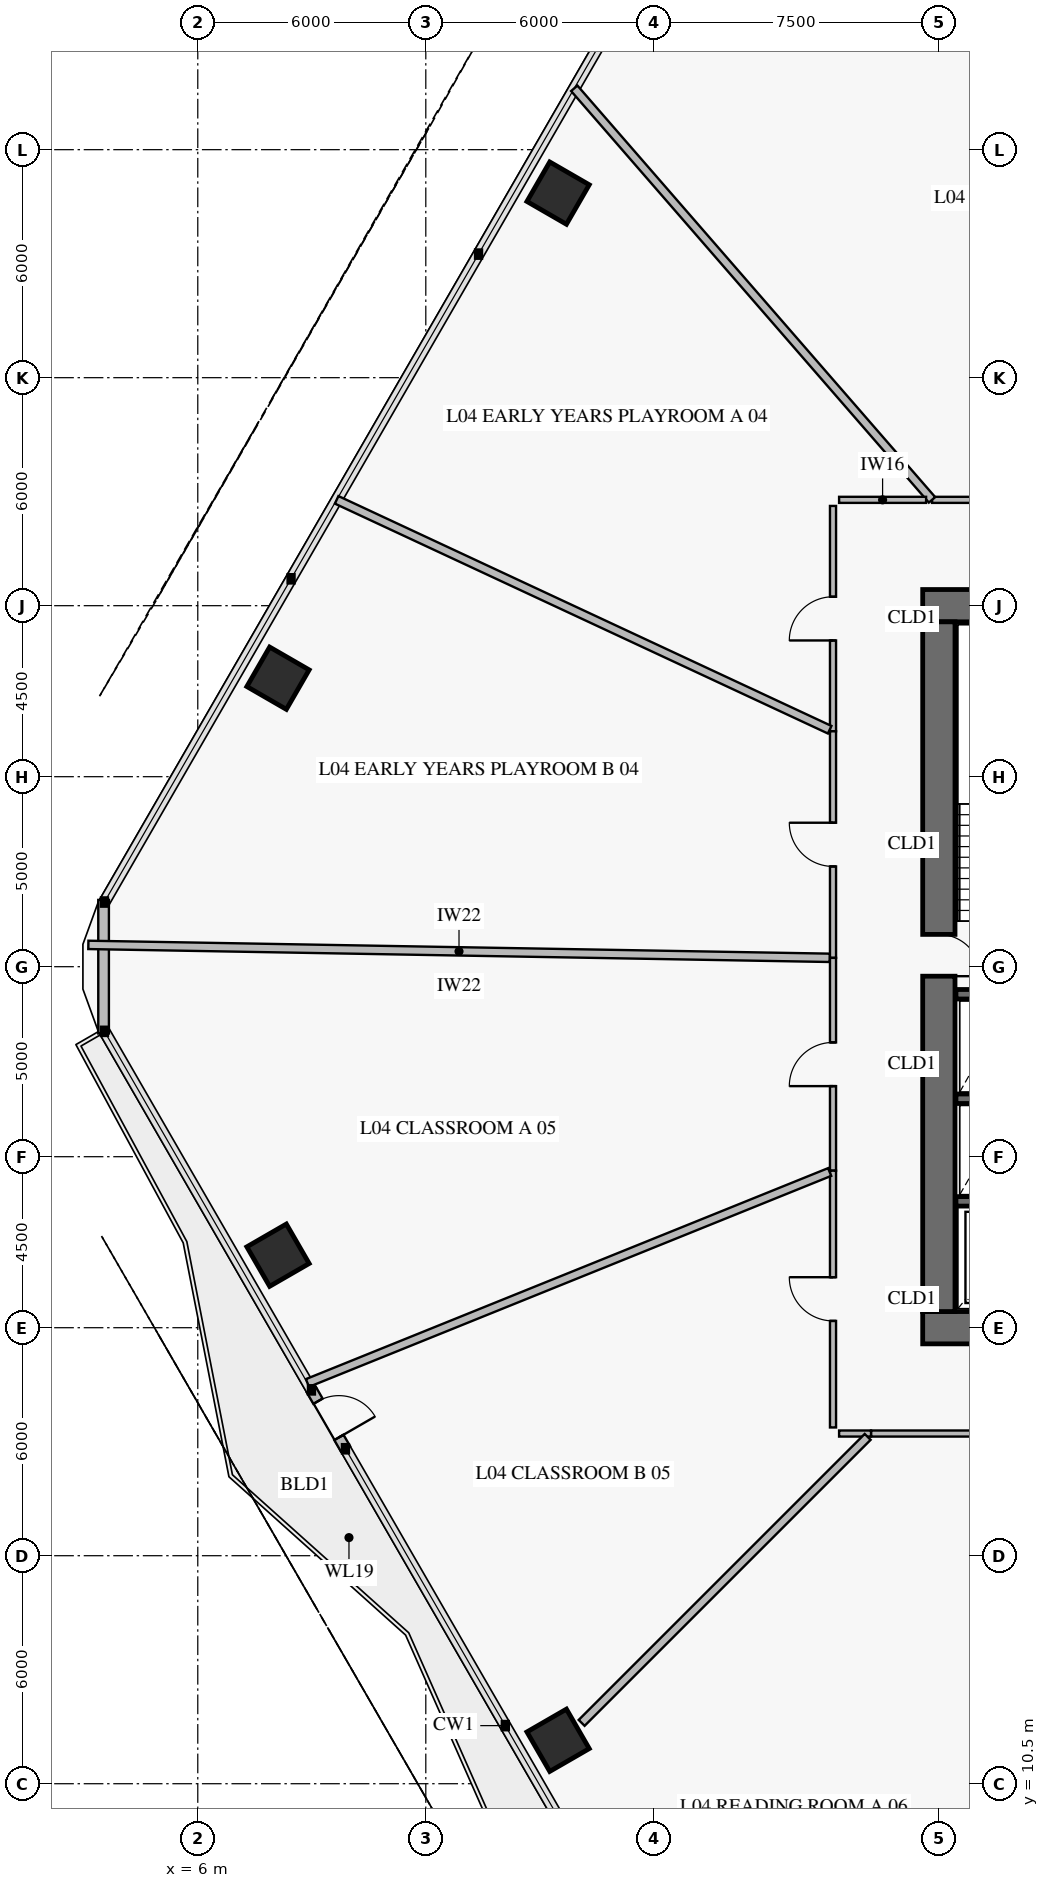
"""IFC4 building model, lengths in metres.
Left out: names, types, materials, properties, quantities, classifications, styles, units other than length and angle.
Written with IfcOpenShell. Run it as: python <this file> out.ifc"""

import sys

from ifc_helpers import new_model, si_unit, direction, frame, frame_2d, origin, origin_2d, place, context, subcontext, project, spatial, rectangle, extrude, element, fill, save


model = new_model("IFC4")
c1 = context("Model", 3, precision=1e-05, world=origin(), true_north=direction((0.0, 1.0)))
c2 = subcontext(c1, "Body", "Model", "MODEL_VIEW")
j1 = project(units=[si_unit("LENGTHUNIT", "METRE"), si_unit("PLANEANGLEUNIT", "RADIAN")], contexts=[c1])
p1 = place(None, origin())
s1 = spatial("IfcSite", under=j1, at=p1, CompositionType="ELEMENT")
p2 = place(p1, origin())
s2 = spatial("IfcBuilding", under=s1, at=p2, CompositionType="ELEMENT")
p3 = place(p2, frame((0.0, 0.0, 16.2)))
s3 = spatial("IfcBuildingStorey", under=s2, at=p3, CompositionType="ELEMENT", Elevation=16.2)
p4 = place(p3, frame((25.075, 22.5, 0.0), z_axis=(0.0, 0.0, 1.0), x_axis=(1.0, 0.0, 0.0)))
e1 = element("IfcWall", 1, at=p4, inside=s3, PredefinedType="SHEAR", context=c2, shape_type="SweptSolid", body=[
    extrude(rectangle(XDim=9.975, YDim=0.85, at=frame_2d((4.988, 0.0))), origin(), (0.0, 0.0, 1.0), 4.2),
])
p5 = place(p4, frame((4.325, 0.0, 0.0)))
e2 = element("IfcOpeningElement", 2, at=p5, cuts=e1, PredefinedType="OPENING", context=c2, shape_type="SweptSolid", body=[
    extrude(rectangle(XDim=1.5, YDim=2.15, at=frame_2d((0.75, 1.075))), frame((0.0, 0.437, 0.0), z_axis=(0.0, -1.0, 0.0), x_axis=(1.0, 0.0, 0.0)), (0.0, 0.0, 1.0), 0.874),
])
p6 = place(p3, frame((36.75, 41.5, 0.0), z_axis=(0.0, 0.0, 1.0), x_axis=(-1.0, 0.0, 0.0)))
e3 = element("IfcWall", 3, at=p6, inside=s3, PredefinedType="SHEAR", context=c2, shape_type="SweptSolid", body=[
    extrude(rectangle(XDim=11.675, YDim=0.85, at=frame_2d((5.837, 0.0))), origin(), (0.0, 0.0, 1.0), 4.2),
])
p7 = place(p6, frame((4.25, 0.0, 0.0)))
e4 = element("IfcOpeningElement", 4, at=p7, cuts=e3, PredefinedType="OPENING", context=c2, shape_type="SweptSolid", body=[
    extrude(rectangle(XDim=1.1, YDim=2.15, at=frame_2d((0.55, 1.075))), frame((0.0, 0.437, 0.0), z_axis=(0.0, -1.0, 0.0), x_axis=(1.0, 0.0, 0.0)), (0.0, 0.0, 1.0), 0.874),
])
p8 = place(p3, frame((25.5, 22.925, 0.0), z_axis=(0.0, 0.0, 1.0), x_axis=(0.0, 1.0, 0.0)))
e5 = element("IfcWall", 5, at=p8, inside=s3, PredefinedType="SHEAR", context=c2, shape_type="SweptSolid", body=[
    extrude(rectangle(XDim=18.15, YDim=0.85, at=frame_2d((9.075, 0.0))), origin(), (0.0, 0.0, 1.0), 4.2),
])
p9 = place(p8, frame((8.825, 0.0, 0.0)))
e6 = element("IfcOpeningElement", 6, at=p9, cuts=e5, PredefinedType="OPENING", context=c2, shape_type="SweptSolid", body=[
    extrude(rectangle(XDim=1.1, YDim=2.15, at=frame_2d((0.55, 1.075))), frame((0.0, 0.437, 0.0), z_axis=(0.0, -1.0, 0.0), x_axis=(1.0, 0.0, 0.0)), (0.0, 0.0, 1.0), 0.874),
])
for number, where, z_axis, x_axis in (
    (7, (15.481, 52.357, 0.0), (0.0, 0.0, 1.0), (-0.5, -0.866, 0.0)),
    (8, (8.111, 39.592, 0.0), (0.0, 0.0, 1.0), (-0.5, -0.866, 0.0)),
    (9, (8.111, 24.408, 0.0), (0.0, 0.0, 1.0), (0.5, -0.866, 0.0)),
    (10, (15.481, 11.643, 0.0), (0.0, 0.0, 1.0), (0.5, -0.866, 0.0)),
):
    element("IfcColumn", number, at=place(p3, frame(where, z_axis=z_axis, x_axis=x_axis)), inside=s3, PredefinedType="COLUMN", context=c2, shape_type="SweptSolid", body=[
        extrude(rectangle(XDim=1.2, YDim=1.2, at=origin_2d()), origin(), (0.0, 0.0, 1.0), 3.92),
    ])
p10 = place(p3, frame((9.886, 19.314, 0.0), z_axis=(0.0, 0.0, 1.0), x_axis=(-0.499982180423, 0.866035691677, 0.0)))
e11 = element("IfcWall", 11, at=p10, inside=s3, PredefinedType="SOLIDWALL", context=c2, shape_type="SweptSolid", body=[
    extrude(rectangle(XDim=1.79, YDim=0.28, at=frame_2d((0.895, 0.0))), origin(), (0.0, 0.0, 1.0), 3.92),
])
p11 = place(p10, frame((0.345, 0.0, 0.0)))
e12 = element("IfcOpeningElement", 12, at=p11, cuts=e11, PredefinedType="OPENING", context=c2, shape_type="SweptSolid", body=[
    extrude(rectangle(XDim=1.1, YDim=2.2, at=frame_2d((0.55, 1.1))), frame((0.0, 0.152, 0.0), z_axis=(0.0, -1.0, 0.0), x_axis=(1.0, 0.0, 0.0)), (0.0, 0.0, 1.0), 0.304),
])
p12 = place(p3, frame((3.521, 30.242, 0.0), z_axis=(0.0, 0.0, 1.0), x_axis=(0.0, 1.0, 0.0)))
e13 = element("IfcWall", 13, at=p12, inside=s3, PredefinedType="SOLIDWALL", context=c2, shape_type="SweptSolid", body=[
    extrude(rectangle(XDim=3.515, YDim=0.28, at=frame_2d((1.758, 0.0))), origin(), (0.0, 0.0, 1.0), 3.92),
])
p13 = place(p3, frame((25.95, 31.275, 0.0), z_axis=(0.0, 0.0, 1.0), x_axis=(1.0, 0.0, 0.0)))
e14 = element("IfcWall", 14, at=p13, inside=s3, PredefinedType="SOLIDWALL", context=c2, shape_type="SweptSolid", body=[
    extrude(rectangle(XDim=20.1, YDim=0.25, at=frame_2d((10.05, 0.0))), origin(), (0.0, 0.0, 1.0), 4.2),
])
p14 = place(p13, frame((2.6, 0.0, 0.0)))
e15 = element("IfcOpeningElement", 15, at=p14, cuts=e14, PredefinedType="OPENING", context=c2, shape_type="SweptSolid", body=[
    extrude(rectangle(XDim=1.1, YDim=2.15, at=frame_2d((0.55, 1.075))), frame((0.0, 0.137, 0.0), z_axis=(0.0, -1.0, 0.0), x_axis=(1.0, 0.0, 0.0)), (0.0, 0.0, 1.0), 0.274),
])
p15 = place(p13, frame((10.6, 0.0, 0.0)))
e16 = element("IfcOpeningElement", 16, at=p15, cuts=e14, PredefinedType="OPENING", context=c2, shape_type="SweptSolid", body=[
    extrude(rectangle(XDim=1.1, YDim=2.15, at=frame_2d((0.55, 1.075))), frame((0.0, 0.137, 0.0), z_axis=(0.0, -1.0, 0.0), x_axis=(1.0, 0.0, 0.0)), (0.0, 0.0, 1.0), 0.274),
])
p16 = place(p13, frame((16.35, 0.0, 0.0)))
e17 = element("IfcOpeningElement", 17, at=p16, cuts=e14, PredefinedType="OPENING", context=c2, shape_type="SweptSolid", body=[
    extrude(rectangle(XDim=1.1, YDim=2.15, at=frame_2d((0.55, 1.075))), frame((0.0, 0.137, 0.0), z_axis=(0.0, -1.0, 0.0), x_axis=(1.0, 0.0, 0.0)), (0.0, 0.0, 1.0), 0.274),
])
for number, where, z_axis, x_axis in (
    (18, (25.95, 25.825, 0.0), (0.0, 0.0, 1.0), (1.0, 0.0, 0.0)),
    (19, (25.95, 28.525, 0.0), (0.0, 0.0, 1.0), (1.0, 0.0, 0.0)),
):
    element("IfcWall", number, at=place(p3, frame(where, z_axis=z_axis, x_axis=x_axis)), inside=s3, PredefinedType="SOLIDWALL", context=c2, shape_type="SweptSolid", body=[
        extrude(rectangle(XDim=2.25, YDim=0.25, at=frame_2d((1.125, 0.0))), origin(), (0.0, 0.0, 1.0), 4.2),
    ])
p17 = place(p3, frame((37.075, 44.285, 0.0), z_axis=(0.0, 0.0, 1.0), x_axis=(-1.0, 0.0, 0.0)))
e20 = element("IfcWall", 20, at=p17, inside=s3, PredefinedType="PARTITIONING", context=c2, shape_type="SweptSolid", body=[
    extrude(rectangle(XDim=11.754, YDim=0.16, at=frame_2d((5.877, 0.0))), origin(), (0.0, 0.0, 1.0), 3.22),
])
p18 = place(p17, frame((5.302, 0.0, 0.0)))
e21 = element("IfcOpeningElement", 21, at=p18, cuts=e20, PredefinedType="OPENING", context=c2, shape_type="SweptSolid", body=[
    extrude(rectangle(XDim=1.15, YDim=2.2, at=frame_2d((0.575, 1.1))), frame((0.0, 0.092, 0.0), z_axis=(0.0, -1.0, 0.0), x_axis=(1.0, 0.0, 0.0)), (0.0, 0.0, 1.0), 0.184),
])
p19 = place(p3, frame((22.715, 44.125, 0.0), z_axis=(0.0, 0.0, 1.0), x_axis=(0.0, -1.0, 0.0)))
e22 = element("IfcWall", 22, at=p19, inside=s3, PredefinedType="PARTITIONING", context=c2, shape_type="SweptSolid", body=[
    extrude(rectangle(XDim=5.93, YDim=0.16, at=frame_2d((2.965, 0.0))), origin(), (0.0, 0.0, 1.0), 3.92),
])
p20 = place(p19, frame((2.39, 0.0, 0.0)))
e23 = element("IfcOpeningElement", 23, at=p20, cuts=e22, PredefinedType="OPENING", context=c2, shape_type="SweptSolid", body=[
    extrude(rectangle(XDim=1.15, YDim=2.2, at=frame_2d((0.575, 1.1))), frame((0.0, 0.092, 0.0), z_axis=(0.0, -1.0, 0.0), x_axis=(1.0, 0.0, 0.0)), (0.0, 0.0, 1.0), 0.184),
])
p21 = place(p3, frame((22.715, 38.195, 0.0), z_axis=(0.0, 0.0, 1.0), x_axis=(0.0, -1.0, 0.0)))
e24 = element("IfcWall", 24, at=p21, inside=s3, PredefinedType="PARTITIONING", context=c2, shape_type="SweptSolid", body=[
    extrude(rectangle(XDim=5.963, YDim=0.16, at=frame_2d((2.981, 0.0))), origin(), (0.0, 0.0, 1.0), 3.22),
])
p22 = place(p21, frame((2.406, 0.0, 0.0)))
e25 = element("IfcOpeningElement", 25, at=p22, cuts=e24, PredefinedType="OPENING", context=c2, shape_type="SweptSolid", body=[
    extrude(rectangle(XDim=1.15, YDim=2.2, at=frame_2d((0.575, 1.1))), frame((0.0, 0.092, 0.0), z_axis=(0.0, -1.0, 0.0), x_axis=(1.0, 0.0, 0.0)), (0.0, 0.0, 1.0), 0.184),
])
p23 = place(p3, frame((22.715, 32.232, 0.0), z_axis=(0.0, 0.0, 1.0), x_axis=(0.0, -1.0, 0.0)))
e26 = element("IfcWall", 26, at=p23, inside=s3, PredefinedType="PARTITIONING", context=c2, shape_type="SweptSolid", body=[
    extrude(rectangle(XDim=5.599, YDim=0.16, at=frame_2d((2.8, 0.0))), origin(), (0.0, 0.0, 1.0), 3.22),
])
p24 = place(p23, frame((2.225, 0.0, 0.0)))
e27 = element("IfcOpeningElement", 27, at=p24, cuts=e26, PredefinedType="OPENING", context=c2, shape_type="SweptSolid", body=[
    extrude(rectangle(XDim=1.15, YDim=2.2, at=frame_2d((0.575, 1.1))), frame((0.0, 0.092, 0.0), z_axis=(0.0, -1.0, 0.0), x_axis=(1.0, 0.0, 0.0)), (0.0, 0.0, 1.0), 0.184),
])
p25 = place(p3, frame((22.715, 26.633, 0.0), z_axis=(0.0, 0.0, 1.0), x_axis=(0.0, -1.0, 0.0)))
e28 = element("IfcWall", 28, at=p25, inside=s3, PredefinedType="PARTITIONING", context=c2, shape_type="SweptSolid", body=[
    extrude(rectangle(XDim=6.758, YDim=0.16, at=frame_2d((3.379, 0.0))), origin(), (0.0, 0.0, 1.0), 3.92),
])
p26 = place(p25, frame((2.804, 0.0, 0.0)))
e29 = element("IfcOpeningElement", 29, at=p26, cuts=e28, PredefinedType="OPENING", context=c2, shape_type="SweptSolid", body=[
    extrude(rectangle(XDim=1.15, YDim=2.2, at=frame_2d((0.575, 1.1))), frame((0.0, 0.092, 0.0), z_axis=(0.0, -1.0, 0.0), x_axis=(1.0, 0.0, 0.0)), (0.0, 0.0, 1.0), 0.184),
])
p27 = place(p3, frame((23.715, 19.715, 0.0), z_axis=(0.0, 0.0, 1.0), x_axis=(1.0, 0.0, 0.0)))
e30 = element("IfcWall", 30, at=p27, inside=s3, PredefinedType="PARTITIONING", context=c2, shape_type="SweptSolid", body=[
    extrude(rectangle(XDim=7.569, YDim=0.16, at=frame_2d((3.785, 0.0))), origin(), (0.0, 0.0, 1.0), 3.22),
])
p28 = place(p27, frame((3.21, 0.0, 0.0)))
e31 = element("IfcOpeningElement", 31, at=p28, cuts=e30, PredefinedType="OPENING", context=c2, shape_type="SweptSolid", body=[
    extrude(rectangle(XDim=1.15, YDim=2.2, at=frame_2d((0.575, 1.1))), frame((0.0, 0.092, 0.0), z_axis=(0.0, -1.0, 0.0), x_axis=(1.0, 0.0, 0.0)), (0.0, 0.0, 1.0), 0.184),
])
p29 = place(p3, frame((25.321, 44.285, 0.0), z_axis=(0.0, 0.0, 1.0), x_axis=(-0.656060762546, 0.754708073263, 0.0)))
e32 = element("IfcWall", 32, at=p29, inside=s3, PredefinedType="PARTITIONING", context=c2, shape_type="SweptSolid", body=[
    extrude(rectangle(XDim=14.349, YDim=0.22, at=frame_2d((7.175, 0.0))), origin(), (0.0, 0.0, 1.0), 3.17),
])
p30 = place(p3, frame((22.627, 38.236, 0.0), z_axis=(0.0, 0.0, 1.0), x_axis=(-0.906309468756, 0.422614655263, 0.0)))
e33 = element("IfcWall", 33, at=p30, inside=s3, PredefinedType="PARTITIONING", context=c2, shape_type="SweptSolid", body=[
    extrude(rectangle(XDim=14.313, YDim=0.22, at=frame_2d((7.157, 0.0))), origin(), (0.0, 0.0, 1.0), 3.17),
])
p31 = place(p3, frame((25.164, 44.285, 0.0), z_axis=(0.0, 0.0, 1.0), x_axis=(-1.0, 0.0, 0.0)))
e34 = element("IfcWall", 34, at=p31, inside=s3, PredefinedType="PARTITIONING", context=c2, shape_type="SweptSolid", body=[
    extrude(rectangle(XDim=2.289, YDim=0.16, at=frame_2d((1.145, 0.0))), origin(), (0.0, 0.0, 1.0), 3.22),
])
p32 = place(p3, frame((22.627, 32.233, 0.0), z_axis=(0.0, 0.0, 1.0), x_axis=(-0.999847613209, 0.017457100559, 0.0)))
e35 = element("IfcWall", 35, at=p32, inside=s3, PredefinedType="PARTITIONING", context=c2, shape_type="SweptSolid", body=[
    extrude(rectangle(XDim=19.509, YDim=0.22, at=frame_2d((9.755, 0.0))), origin(), (0.0, 0.0, 1.0), 3.17),
])
p33 = place(p3, frame((22.627, 26.597, 0.0), z_axis=(0.0, 0.0, 1.0), x_axis=(-0.927186166431, -0.3746008713, 0.0)))
e36 = element("IfcWall", 36, at=p33, inside=s3, PredefinedType="PARTITIONING", context=c2, shape_type="SweptSolid", body=[
    extrude(rectangle(XDim=14.82, YDim=0.22, at=frame_2d((7.41, 0.0))), origin(), (0.0, 0.0, 1.0), 3.17),
])
p34 = place(p3, frame((22.875, 19.715, 0.0), z_axis=(0.0, 0.0, 1.0), x_axis=(1.0, 0.0, 0.0)))
e37 = element("IfcWall", 37, at=p34, inside=s3, PredefinedType="PARTITIONING", context=c2, shape_type="SweptSolid", body=[
    extrude(rectangle(XDim=0.84, YDim=0.16, at=frame_2d((0.42, 0.0))), origin(), (0.0, 0.0, 1.0), 3.22),
])
p35 = place(p3, frame((23.627, 19.627, 0.0), z_axis=(0.0, 0.0, 1.0), x_axis=(-0.707106781187, -0.707106781187, 0.0)))
e38 = element("IfcWall", 38, at=p35, inside=s3, PredefinedType="PARTITIONING", context=c2, shape_type="SweptSolid", body=[
    extrude(rectangle(XDim=10.643, YDim=0.22, at=frame_2d((5.322, 0.0))), origin(), (0.0, 0.0, 1.0), 3.22),
])
p36 = place(p3, frame((31.25, 19.627, 0.0), z_axis=(0.0, 0.0, 1.0), x_axis=(-0.358374904207, -0.933577756823, 0.0)))
e39 = element("IfcWall", 39, at=p36, inside=s3, PredefinedType="PARTITIONING", context=c2, shape_type="SweptSolid", body=[
    extrude(rectangle(XDim=17.765, YDim=0.22, at=frame_2d((8.883, 0.0))), origin(), (0.0, 0.0, 1.0), 3.17),
])
p37 = place(p11, frame((1.1, 0.0, 0.0), z_axis=(0.0, 0.0, 1.0), x_axis=(-1.0, 0.0, 0.0)))
e40 = element("IfcDoor", 40, at=p37, inside=s3, OperationType="SINGLE_SWING_RIGHT", PredefinedType="DOOR", context=c2, shape_type="SweptSolid", body=[
    extrude(rectangle(XDim=1.1, YDim=2.2, at=frame_2d((0.55, 1.1))), frame((0.0, 0.025, 0.0), z_axis=(0.0, -1.0, 0.0), x_axis=(1.0, 0.0, 0.0)), (0.0, 0.0, 1.0), 0.05),
])
fill(e12, e40)
p38 = place(p9, frame((1.1, 0.0, 0.0), z_axis=(0.0, 0.0, 1.0), x_axis=(-1.0, 0.0, 0.0)))
e41 = element("IfcDoor", 41, at=p38, inside=s3, OperationType="SINGLE_SWING_RIGHT", PredefinedType="USERDEFINED", context=c2, shape_type="SweptSolid", body=[
    extrude(rectangle(XDim=1.1, YDim=2.15, at=frame_2d((0.55, 1.075))), frame((0.0, 0.025, 0.0), z_axis=(0.0, -1.0, 0.0), x_axis=(1.0, 0.0, 0.0)), (0.0, 0.0, 1.0), 0.05),
])
fill(e6, e41)
p39 = place(p20, frame((1.15, 0.0, 0.0), z_axis=(0.0, 0.0, 1.0), x_axis=(-1.0, 0.0, 0.0)))
e42 = element("IfcDoor", 42, at=p39, inside=s3, OperationType="SINGLE_SWING_LEFT", PredefinedType="DOOR", context=c2, shape_type="SweptSolid", body=[
    extrude(rectangle(XDim=1.15, YDim=2.2, at=frame_2d((0.575, 1.1))), frame((0.0, 0.025, 0.0), z_axis=(0.0, -1.0, 0.0), x_axis=(1.0, 0.0, 0.0)), (0.0, 0.0, 1.0), 0.05),
])
fill(e23, e42)
p40 = place(p22, frame((1.15, 0.0, 0.0), z_axis=(0.0, 0.0, 1.0), x_axis=(-1.0, 0.0, 0.0)))
e43 = element("IfcDoor", 43, at=p40, inside=s3, OperationType="SINGLE_SWING_RIGHT", PredefinedType="DOOR", context=c2, shape_type="SweptSolid", body=[
    extrude(rectangle(XDim=1.15, YDim=2.2, at=frame_2d((0.575, 1.1))), frame((0.0, 0.025, 0.0), z_axis=(0.0, -1.0, 0.0), x_axis=(1.0, 0.0, 0.0)), (0.0, 0.0, 1.0), 0.05),
])
fill(e25, e43)
p41 = place(p24, frame((1.15, 0.0, 0.0), z_axis=(0.0, 0.0, 1.0), x_axis=(-1.0, 0.0, 0.0)))
e44 = element("IfcDoor", 44, at=p41, inside=s3, OperationType="SINGLE_SWING_LEFT", PredefinedType="DOOR", context=c2, shape_type="SweptSolid", body=[
    extrude(rectangle(XDim=1.15, YDim=2.2, at=frame_2d((0.575, 1.1))), frame((0.0, 0.025, 0.0), z_axis=(0.0, -1.0, 0.0), x_axis=(1.0, 0.0, 0.0)), (0.0, 0.0, 1.0), 0.05),
])
fill(e27, e44)
p42 = place(p26, frame((1.15, 0.0, 0.0), z_axis=(0.0, 0.0, 1.0), x_axis=(-1.0, 0.0, 0.0)))
e45 = element("IfcDoor", 45, at=p42, inside=s3, OperationType="SINGLE_SWING_RIGHT", PredefinedType="DOOR", context=c2, shape_type="SweptSolid", body=[
    extrude(rectangle(XDim=1.15, YDim=2.2, at=frame_2d((0.575, 1.1))), frame((0.0, 0.025, 0.0), z_axis=(0.0, -1.0, 0.0), x_axis=(1.0, 0.0, 0.0)), (0.0, 0.0, 1.0), 0.05),
])
fill(e29, e45)
save(model, sys.argv[1])
